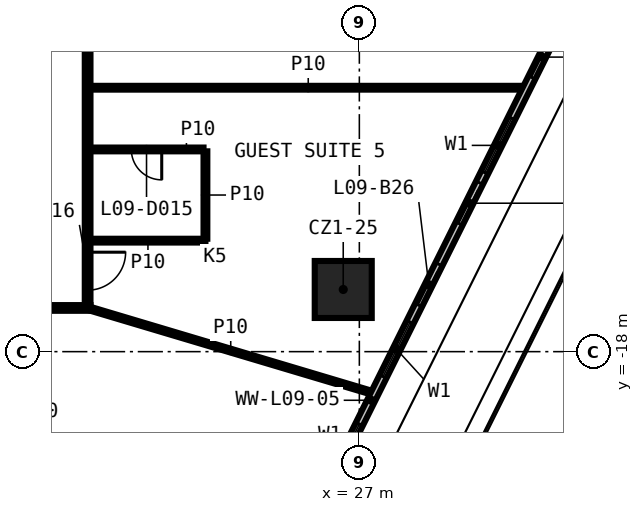
"""IFC4 building model, lengths in metres.
Left out: names, types, materials, properties, quantities, classifications, styles, units other than length and angle.
Written with IfcOpenShell. Run it as: python <this file> out.ifc"""

import sys

from ifc_helpers import new_model, si_unit, direction, frame, frame_2d, origin, origin_2d, place, context, subcontext, project, spatial, rectangle, extrude, element, fill, save


model = new_model("IFC4")
c1 = context("Model", 3, precision=1e-05, world=origin(), true_north=direction((0.0, 1.0)))
c2 = subcontext(c1, "Body", "Model", "MODEL_VIEW")
j1 = project(units=[si_unit("LENGTHUNIT", "METRE"), si_unit("PLANEANGLEUNIT", "RADIAN")], contexts=[c1])
p1 = place(None, origin())
s1 = spatial("IfcSite", under=j1, at=p1, CompositionType="ELEMENT")
p2 = place(p1, origin())
s2 = spatial("IfcBuilding", under=s1, at=p2, CompositionType="ELEMENT")
p3 = place(p2, frame((0.0, 0.0, 55.1)))
s3 = spatial("IfcBuildingStorey", under=s2, at=p3, CompositionType="ELEMENT", Elevation=55.1)
p4 = place(p3, frame((26.576, -16.364, 0.0), z_axis=(0.0, 0.0, 1.0), x_axis=(1.0, 0.0, 0.0)))
e1 = element("IfcColumn", 1, at=p4, inside=s3, PredefinedType="COLUMN", context=c2, shape_type="SweptSolid", body=[
    extrude(rectangle(XDim=1.5, YDim=1.5, at=origin_2d()), origin(), (0.0, 0.0, 1.0), 3.3),
])
p5 = place(p3, frame((19.925, -16.85, 0.0), z_axis=(0.0, 0.0, 1.0), x_axis=(-1.0, 0.0, 0.0)))
e2 = element("IfcWall", 2, at=p5, inside=s3, PredefinedType="PARTITIONING", context=c2, shape_type="SweptSolid", body=[
    extrude(rectangle(XDim=39.85, YDim=0.15, at=frame_2d((19.925, 0.0))), origin(), (0.0, 0.0, 1.0), 3.3),
])
p6 = place(p5, frame((35.041, 0.0, 0.0)))
e3 = element("IfcOpeningElement", 3, at=p6, cuts=e2, PredefinedType="OPENING", context=c2, shape_type="SweptSolid", body=[
    extrude(rectangle(XDim=0.9, YDim=2.1, at=frame_2d((0.45, 1.05))), frame((0.0, 0.085, 0.0), z_axis=(0.0, -1.0, 0.0), x_axis=(1.0, 0.0, 0.0)), (0.0, 0.0, 1.0), 0.17),
])
p7 = place(p5, frame((31.0, 0.0, 0.0)))
e4 = element("IfcOpeningElement", 4, at=p7, cuts=e2, PredefinedType="OPENING", context=c2, shape_type="SweptSolid", body=[
    extrude(rectangle(XDim=1.0, YDim=2.1, at=frame_2d((0.5, 1.05))), frame((0.0, 0.085, 0.0), z_axis=(0.0, -1.0, 0.0), x_axis=(1.0, 0.0, 0.0)), (0.0, 0.0, 1.0), 0.17),
])
p8 = place(p5, frame((25.711, 0.0, 0.0)))
e5 = element("IfcOpeningElement", 5, at=p8, cuts=e2, PredefinedType="OPENING", context=c2, shape_type="SweptSolid", body=[
    extrude(rectangle(XDim=0.9, YDim=2.1, at=frame_2d((0.45, 1.05))), frame((0.0, 0.085, 0.0), z_axis=(0.0, -1.0, 0.0), x_axis=(1.0, 0.0, 0.0)), (0.0, 0.0, 1.0), 0.17),
])
p9 = place(p5, frame((22.072, 0.0, 0.0)))
e6 = element("IfcOpeningElement", 6, at=p9, cuts=e2, PredefinedType="OPENING", context=c2, shape_type="SweptSolid", body=[
    extrude(rectangle(XDim=0.9, YDim=2.1, at=frame_2d((0.45, 1.05))), frame((0.0, 0.085, 0.0), z_axis=(0.0, -1.0, 0.0), x_axis=(1.0, 0.0, 0.0)), (0.0, 0.0, 1.0), 0.17),
])
p10 = place(p5, frame((17.034, 0.0, 0.0)))
e7 = element("IfcOpeningElement", 7, at=p10, cuts=e2, PredefinedType="OPENING", context=c2, shape_type="SweptSolid", body=[
    extrude(rectangle(XDim=0.9, YDim=2.1, at=frame_2d((0.45, 1.05))), frame((0.0, 0.085, 0.0), z_axis=(0.0, -1.0, 0.0), x_axis=(1.0, 0.0, 0.0)), (0.0, 0.0, 1.0), 0.17),
])
p11 = place(p5, frame((13.675, 0.0, 0.0)))
e8 = element("IfcOpeningElement", 8, at=p11, cuts=e2, PredefinedType="OPENING", context=c2, shape_type="SweptSolid", body=[
    extrude(rectangle(XDim=0.9, YDim=2.1, at=frame_2d((0.45, 1.05))), frame((0.0, 0.085, 0.0), z_axis=(0.0, -1.0, 0.0), x_axis=(1.0, 0.0, 0.0)), (0.0, 0.0, 1.0), 0.17),
])
p12 = place(p5, frame((4.031, 0.0, 0.0)))
e9 = element("IfcOpeningElement", 9, at=p12, cuts=e2, PredefinedType="OPENING", context=c2, shape_type="SweptSolid", body=[
    extrude(rectangle(XDim=1.0, YDim=2.1, at=frame_2d((0.5, 1.05))), frame((0.0, 0.085, 0.0), z_axis=(0.0, -1.0, 0.0), x_axis=(1.0, 0.0, 0.0)), (0.0, 0.0, 1.0), 0.17),
])
p13 = place(p3, frame((19.925, -15.079, 0.0), z_axis=(0.0, 0.0, 1.0), x_axis=(1.0, 0.0, 0.0)))
e10 = element("IfcWall", 10, at=p13, inside=s3, PredefinedType="PARTITIONING", context=c2, shape_type="SweptSolid", body=[
    extrude(rectangle(XDim=3.025, YDim=0.1, at=frame_2d((1.512, 0.0))), origin(), (0.0, 0.0, 1.0), 3.3),
])
p14 = place(p3, frame((22.9, -12.679, 0.0), z_axis=(0.0, 0.0, 1.0), x_axis=(-1.0, 0.0, 0.0)))
e11 = element("IfcWall", 11, at=p14, inside=s3, PredefinedType="PARTITIONING", context=c2, shape_type="SweptSolid", body=[
    extrude(rectangle(XDim=2.975, YDim=0.1, at=frame_2d((1.487, 0.0))), origin(), (0.0, 0.0, 1.0), 3.3),
])
p15 = place(p14, frame((1.1, 0.0, 0.0)))
e12 = element("IfcOpeningElement", 12, at=p15, cuts=e11, PredefinedType="OPENING", context=c2, shape_type="SweptSolid", body=[
    extrude(rectangle(XDim=0.8, YDim=2.1, at=frame_2d((0.4, 1.05))), frame((0.0, 0.06, 0.0), z_axis=(0.0, -1.0, 0.0), x_axis=(1.0, 0.0, 0.0)), (0.0, 0.0, 1.0), 0.12),
])
p16 = place(p3, frame((19.925, -11.055, 0.0), z_axis=(0.0, 0.0, 1.0), x_axis=(1.0, 0.0, 0.0)))
e13 = element("IfcWall", 13, at=p16, inside=s3, PredefinedType="PARTITIONING", context=c2, shape_type="SweptSolid", body=[
    extrude(rectangle(XDim=11.46, YDim=0.1, at=frame_2d((5.73, 0.0))), origin(), (0.0, 0.0, 1.0), 3.3),
])
p17 = place(p3, frame((22.95, -15.029, 0.0), z_axis=(0.0, 0.0, 1.0), x_axis=(0.0, 1.0, 0.0)))
e14 = element("IfcWall", 14, at=p17, inside=s3, PredefinedType="PARTITIONING", context=c2, shape_type="SweptSolid", body=[
    extrude(rectangle(XDim=2.3, YDim=0.1, at=frame_2d((1.15, 0.0))), origin(), (0.0, 0.0, 1.0), 3.3),
])
p18 = place(p3, frame((19.85, 16.775, 0.0), z_axis=(0.0, 0.0, 1.0), x_axis=(0.0, -1.0, 0.0)))
e15 = element("IfcWall", 15, at=p18, inside=s3, PredefinedType="PARTITIONING", context=c2, shape_type="SweptSolid", body=[
    extrude(rectangle(XDim=33.55, YDim=0.15, at=frame_2d((16.775, 0.0))), origin(), (0.0, 0.0, 1.0), 3.3),
])
p19 = place(p18, frame((32.158, 0.0, 0.0)))
e16 = element("IfcOpeningElement", 16, at=p19, cuts=e15, PredefinedType="OPENING", context=c2, shape_type="SweptSolid", body=[
    extrude(rectangle(XDim=1.0, YDim=2.1, at=frame_2d((0.5, 1.05))), frame((0.0, 0.085, 0.0), z_axis=(0.0, -1.0, 0.0), x_axis=(1.0, 0.0, 0.0)), (0.0, 0.0, 1.0), 0.17),
])
p20 = place(p18, frame((20.094, 0.0, 0.0)))
e17 = element("IfcOpeningElement", 17, at=p20, cuts=e15, PredefinedType="OPENING", context=c2, shape_type="SweptSolid", body=[
    extrude(rectangle(XDim=1.0, YDim=2.1, at=frame_2d((0.5, 1.05))), frame((0.0, 0.085, 0.0), z_axis=(0.0, -1.0, 0.0), x_axis=(1.0, 0.0, 0.0)), (0.0, 0.0, 1.0), 0.17),
])
p21 = place(p18, frame((18.428, 0.0, 0.0)))
e18 = element("IfcOpeningElement", 18, at=p21, cuts=e15, PredefinedType="OPENING", context=c2, shape_type="SweptSolid", body=[
    extrude(rectangle(XDim=1.0, YDim=2.1, at=frame_2d((0.5, 1.05))), frame((0.0, 0.085, 0.0), z_axis=(0.0, -1.0, 0.0), x_axis=(1.0, 0.0, 0.0)), (0.0, 0.0, 1.0), 0.17),
])
p22 = place(p18, frame((10.072, 0.0, 0.0)))
e19 = element("IfcOpeningElement", 19, at=p22, cuts=e15, PredefinedType="OPENING", context=c2, shape_type="SweptSolid", body=[
    extrude(rectangle(XDim=1.0, YDim=2.1, at=frame_2d((0.5, 1.05))), frame((0.0, 0.085, 0.0), z_axis=(0.0, -1.0, 0.0), x_axis=(1.0, 0.0, 0.0)), (0.0, 0.0, 1.0), 0.17),
])
p23 = place(p18, frame((3.156, 0.0, 0.0)))
e20 = element("IfcOpeningElement", 20, at=p23, cuts=e15, PredefinedType="OPENING", context=c2, shape_type="SweptSolid", body=[
    extrude(rectangle(XDim=1.0, YDim=2.1, at=frame_2d((0.5, 1.05))), frame((0.0, 0.085, 0.0), z_axis=(0.0, -1.0, 0.0), x_axis=(1.0, 0.0, 0.0)), (0.0, 0.0, 1.0), 0.17),
])
p24 = place(p3, frame((19.85, -16.85, 0.0), z_axis=(0.0, 0.0, 1.0), x_axis=(0.958273131703, -0.285854167464, 0.0)))
e21 = element("IfcWall", 21, at=p24, inside=s3, PredefinedType="PARTITIONING", context=c2, shape_type="SweptSolid", body=[
    extrude(rectangle(XDim=7.859, YDim=0.1, at=frame_2d((3.93, 0.0))), origin(), (0.0, 0.0, 1.0), 3.3),
])
p25 = place(p3, frame((21.391, -31.175, 0.0), z_axis=(0.0, 0.0, 1.0), x_axis=(0.445673586032, 0.895195539932, 0.0)))
e22 = element("IfcWall", 22, at=p25, inside=s3, PredefinedType="SOLIDWALL", context=c2, shape_type="SweptSolid", body=[
    extrude(rectangle(XDim=31.466, YDim=0.2, at=frame_2d((15.733, 0.0))), origin(), (0.0, 0.0, 1.0), 3.3),
])
p26 = place(p25, frame((2.0, 0.0, 0.6)))
e23 = element("IfcOpeningElement", 23, at=p26, cuts=e22, PredefinedType="OPENING", context=c2, shape_type="SweptSolid", body=[
    extrude(rectangle(XDim=1.6, YDim=2.4, at=frame_2d((0.8, 1.2))), frame((0.0, 0.11, 0.0), z_axis=(0.0, -1.0, 0.0), x_axis=(1.0, 0.0, 0.0)), (0.0, 0.0, 1.0), 0.22),
])
p27 = place(p25, frame((0.5, 0.0, 0.0)))
e24 = element("IfcOpeningElement", 24, at=p27, cuts=e22, PredefinedType="OPENING", context=c2, shape_type="SweptSolid", body=[
    extrude(rectangle(XDim=1.2, YDim=2.4, at=frame_2d((0.6, 1.2))), frame((0.0, 0.11, 0.0), z_axis=(0.0, -1.0, 0.0), x_axis=(1.0, 0.0, 0.0)), (0.0, 0.0, 1.0), 0.22),
])
p28 = place(p25, frame((4.995, 0.0, 0.6)))
e25 = element("IfcOpeningElement", 25, at=p28, cuts=e22, PredefinedType="OPENING", context=c2, shape_type="SweptSolid", body=[
    extrude(rectangle(XDim=1.6, YDim=2.4, at=frame_2d((0.8, 1.2))), frame((0.0, 0.11, 0.0), z_axis=(0.0, -1.0, 0.0), x_axis=(1.0, 0.0, 0.0)), (0.0, 0.0, 1.0), 0.22),
])
p29 = place(p25, frame((7.495, 0.0, 0.0)))
e26 = element("IfcOpeningElement", 26, at=p29, cuts=e22, PredefinedType="OPENING", context=c2, shape_type="SweptSolid", body=[
    extrude(rectangle(XDim=1.2, YDim=2.4, at=frame_2d((0.6, 1.2))), frame((0.0, 0.11, 0.0), z_axis=(0.0, -1.0, 0.0), x_axis=(1.0, 0.0, 0.0)), (0.0, 0.0, 1.0), 0.22),
])
p30 = place(p25, frame((10.99, 0.0, 0.6)))
e27 = element("IfcOpeningElement", 27, at=p30, cuts=e22, PredefinedType="OPENING", context=c2, shape_type="SweptSolid", body=[
    extrude(rectangle(XDim=1.6, YDim=2.4, at=frame_2d((0.8, 1.2))), frame((0.0, 0.11, 0.0), z_axis=(0.0, -1.0, 0.0), x_axis=(1.0, 0.0, 0.0)), (0.0, 0.0, 1.0), 0.22),
])
p31 = place(p25, frame((9.49, 0.0, 0.0)))
e28 = element("IfcOpeningElement", 28, at=p31, cuts=e22, PredefinedType="OPENING", context=c2, shape_type="SweptSolid", body=[
    extrude(rectangle(XDim=1.2, YDim=2.4, at=frame_2d((0.6, 1.2))), frame((0.0, 0.11, 0.0), z_axis=(0.0, -1.0, 0.0), x_axis=(1.0, 0.0, 0.0)), (0.0, 0.0, 1.0), 0.22),
])
p32 = place(p25, frame((13.986, 0.0, 0.6)))
e29 = element("IfcOpeningElement", 29, at=p32, cuts=e22, PredefinedType="OPENING", context=c2, shape_type="SweptSolid", body=[
    extrude(rectangle(XDim=1.6, YDim=2.4, at=frame_2d((0.8, 1.2))), frame((0.0, 0.11, 0.0), z_axis=(0.0, -1.0, 0.0), x_axis=(1.0, 0.0, 0.0)), (0.0, 0.0, 1.0), 0.22),
])
p33 = place(p25, frame((16.085, 0.0, 0.0)))
e30 = element("IfcOpeningElement", 30, at=p33, cuts=e22, PredefinedType="OPENING", context=c2, shape_type="SweptSolid", body=[
    extrude(rectangle(XDim=1.2, YDim=2.4, at=frame_2d((0.6, 1.2))), frame((0.0, 0.11, 0.0), z_axis=(0.0, -1.0, 0.0), x_axis=(1.0, 0.0, 0.0)), (0.0, 0.0, 1.0), 0.22),
])
p34 = place(p25, frame((19.981, 0.0, 0.6)))
e31 = element("IfcOpeningElement", 31, at=p34, cuts=e22, PredefinedType="OPENING", context=c2, shape_type="SweptSolid", body=[
    extrude(rectangle(XDim=1.6, YDim=2.4, at=frame_2d((0.8, 1.2))), frame((0.0, 0.11, 0.0), z_axis=(0.0, -1.0, 0.0), x_axis=(1.0, 0.0, 0.0)), (0.0, 0.0, 1.0), 0.22),
])
p35 = place(p25, frame((18.481, 0.0, 0.0)))
e32 = element("IfcOpeningElement", 32, at=p35, cuts=e22, PredefinedType="OPENING", context=c2, shape_type="SweptSolid", body=[
    extrude(rectangle(XDim=1.2, YDim=2.4, at=frame_2d((0.6, 1.2))), frame((0.0, 0.11, 0.0), z_axis=(0.0, -1.0, 0.0), x_axis=(1.0, 0.0, 0.0)), (0.0, 0.0, 1.0), 0.22),
])
p36 = place(p25, frame((24.476, 0.0, 0.6)))
e33 = element("IfcOpeningElement", 33, at=p36, cuts=e22, PredefinedType="OPENING", context=c2, shape_type="SweptSolid", body=[
    extrude(rectangle(XDim=1.6, YDim=2.4, at=frame_2d((0.8, 1.2))), frame((0.0, 0.11, 0.0), z_axis=(0.0, -1.0, 0.0), x_axis=(1.0, 0.0, 0.0)), (0.0, 0.0, 1.0), 0.22),
])
p37 = place(p25, frame((22.776, 0.0, 0.0)))
e34 = element("IfcOpeningElement", 34, at=p37, cuts=e22, PredefinedType="OPENING", context=c2, shape_type="SweptSolid", body=[
    extrude(rectangle(XDim=1.2, YDim=2.4, at=frame_2d((0.6, 1.2))), frame((0.0, 0.11, 0.0), z_axis=(0.0, -1.0, 0.0), x_axis=(1.0, 0.0, 0.0)), (0.0, 0.0, 1.0), 0.22),
])
p38 = place(p25, frame((28.971, 0.0, 0.6)))
e35 = element("IfcOpeningElement", 35, at=p38, cuts=e22, PredefinedType="OPENING", context=c2, shape_type="SweptSolid", body=[
    extrude(rectangle(XDim=1.6, YDim=2.4, at=frame_2d((0.8, 1.2))), frame((0.0, 0.11, 0.0), z_axis=(0.0, -1.0, 0.0), x_axis=(1.0, 0.0, 0.0)), (0.0, 0.0, 1.0), 0.22),
])
p39 = place(p25, frame((27.471, 0.0, 0.0)))
e36 = element("IfcOpeningElement", 36, at=p39, cuts=e22, PredefinedType="OPENING", context=c2, shape_type="SweptSolid", body=[
    extrude(rectangle(XDim=1.2, YDim=2.4, at=frame_2d((0.6, 1.2))), frame((0.0, 0.11, 0.0), z_axis=(0.0, -1.0, 0.0), x_axis=(1.0, 0.0, 0.0)), (0.0, 0.0, 1.0), 0.22),
])
p40 = place(p15, origin())
e37 = element("IfcDoor", 37, at=p40, inside=s3, OperationType="SINGLE_SWING_LEFT", PredefinedType="DOOR", context=c2, shape_type="SweptSolid", body=[
    extrude(rectangle(XDim=0.8, YDim=2.1, at=frame_2d((0.4, 1.05))), frame((0.0, 0.025, 0.0), z_axis=(0.0, -1.0, 0.0), x_axis=(1.0, 0.0, 0.0)), (0.0, 0.0, 1.0), 0.05),
])
fill(e12, e37)
p41 = place(p19, origin())
e38 = element("IfcDoor", 38, at=p41, inside=s3, OperationType="SINGLE_SWING_RIGHT", PredefinedType="DOOR", context=c2, shape_type="SweptSolid", body=[
    extrude(rectangle(XDim=1.0, YDim=2.1, at=frame_2d((0.5, 1.05))), frame((0.0, 0.025, 0.0), z_axis=(0.0, -1.0, 0.0), x_axis=(1.0, 0.0, 0.0)), (0.0, 0.0, 1.0), 0.05),
])
fill(e16, e38)
p42 = place(p30, origin())
e39 = element("IfcWindow", 39, at=p42, inside=s3, PartitioningType="SINGLE_PANEL", PredefinedType="WINDOW", context=c2, shape_type="SweptSolid", body=[
    extrude(rectangle(XDim=1.6, YDim=2.4, at=frame_2d((0.8, 1.2))), frame((0.0, 0.03, 0.0), z_axis=(0.0, -1.0, 0.0), x_axis=(1.0, 0.0, 0.0)), (0.0, 0.0, 1.0), 0.06),
])
fill(e27, e39)
p43 = place(p32, origin())
e40 = element("IfcWindow", 40, at=p43, inside=s3, PartitioningType="SINGLE_PANEL", PredefinedType="WINDOW", context=c2, shape_type="SweptSolid", body=[
    extrude(rectangle(XDim=1.6, YDim=2.4, at=frame_2d((0.8, 1.2))), frame((0.0, 0.03, 0.0), z_axis=(0.0, -1.0, 0.0), x_axis=(1.0, 0.0, 0.0)), (0.0, 0.0, 1.0), 0.06),
])
fill(e29, e40)
p44 = place(p33, origin())
e41 = element("IfcDoor", 41, at=p44, inside=s3, OperationType="SLIDING_TO_LEFT", PredefinedType="DOOR", context=c2, shape_type="SweptSolid", body=[
    extrude(rectangle(XDim=1.2, YDim=2.4, at=frame_2d((0.6, 1.2))), frame((0.0, 0.025, 0.0), z_axis=(0.0, -1.0, 0.0), x_axis=(1.0, 0.0, 0.0)), (0.0, 0.0, 1.0), 0.05),
])
fill(e30, e41)
p45 = place(p34, origin())
e42 = element("IfcWindow", 42, at=p45, inside=s3, PartitioningType="SINGLE_PANEL", PredefinedType="WINDOW", context=c2, shape_type="SweptSolid", body=[
    extrude(rectangle(XDim=1.6, YDim=2.4, at=frame_2d((0.8, 1.2))), frame((0.0, 0.03, 0.0), z_axis=(0.0, -1.0, 0.0), x_axis=(1.0, 0.0, 0.0)), (0.0, 0.0, 1.0), 0.06),
])
fill(e31, e42)
p46 = place(p35, origin())
e43 = element("IfcDoor", 43, at=p46, inside=s3, OperationType="SLIDING_TO_LEFT", PredefinedType="DOOR", context=c2, shape_type="SweptSolid", body=[
    extrude(rectangle(XDim=1.2, YDim=2.4, at=frame_2d((0.6, 1.2))), frame((0.0, 0.025, 0.0), z_axis=(0.0, -1.0, 0.0), x_axis=(1.0, 0.0, 0.0)), (0.0, 0.0, 1.0), 0.05),
])
fill(e32, e43)
p47 = place(p37, origin())
e44 = element("IfcDoor", 44, at=p47, inside=s3, OperationType="SLIDING_TO_LEFT", PredefinedType="DOOR", context=c2, shape_type="SweptSolid", body=[
    extrude(rectangle(XDim=1.2, YDim=2.4, at=frame_2d((0.6, 1.2))), frame((0.0, 0.025, 0.0), z_axis=(0.0, -1.0, 0.0), x_axis=(1.0, 0.0, 0.0)), (0.0, 0.0, 1.0), 0.05),
])
fill(e34, e44)
save(model, sys.argv[1])
